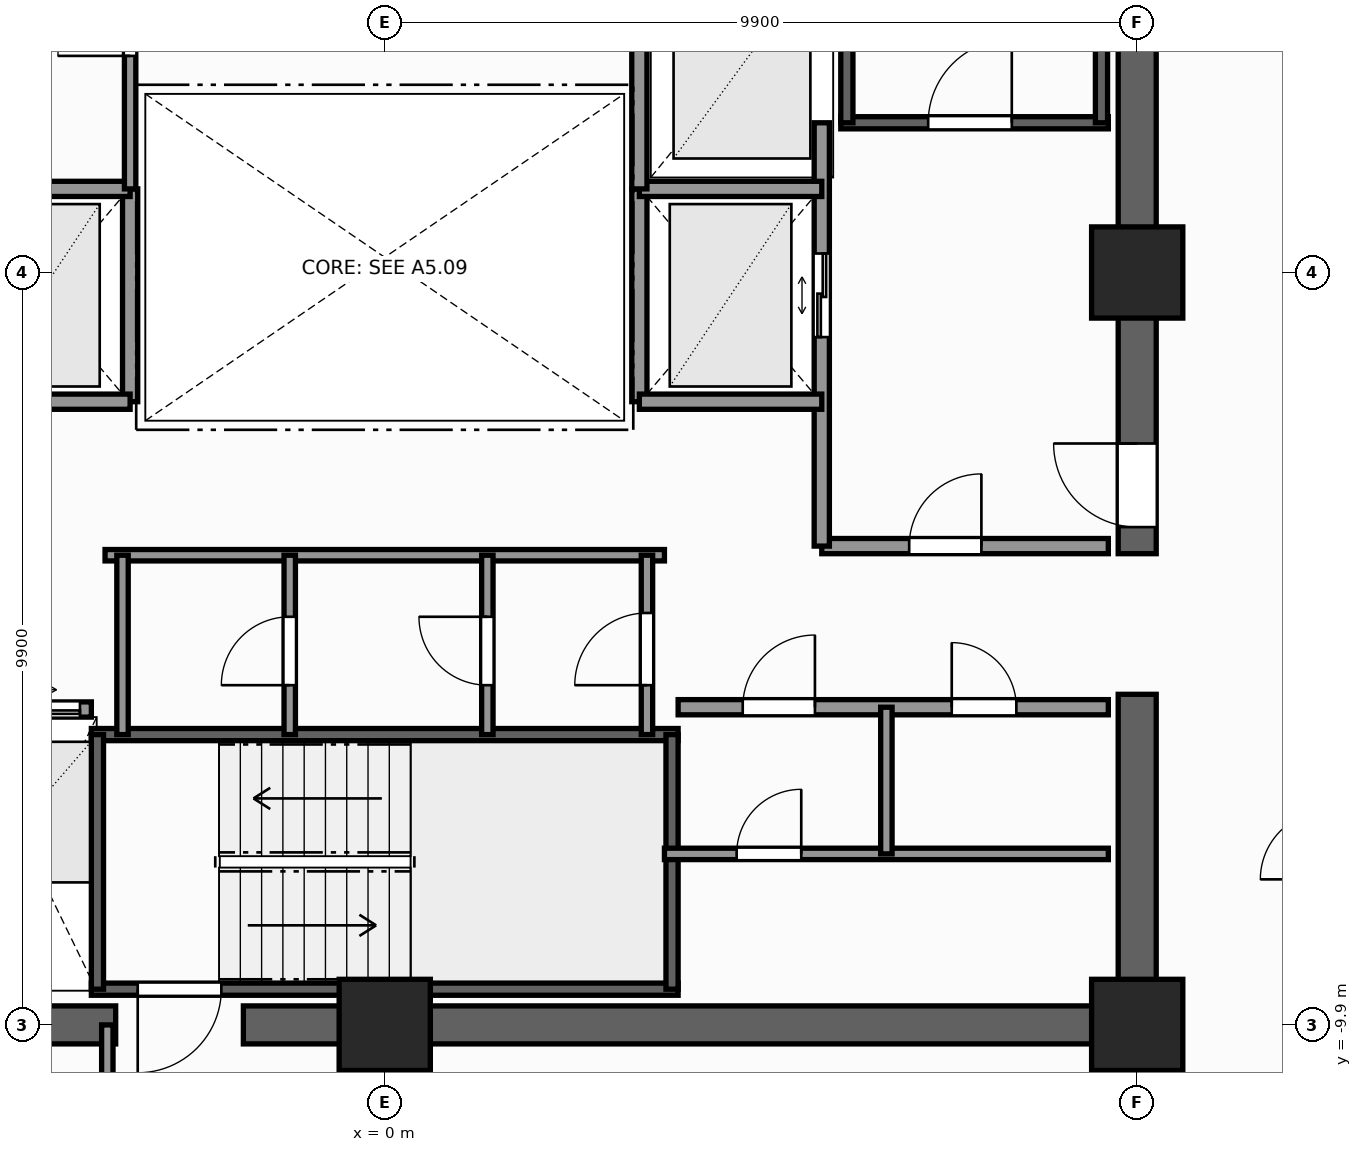
"""IFC4 building model, lengths in metres.
Left out: names, types, materials, properties, quantities, classifications, styles, units other than length and angle.
Written with IfcOpenShell. Run it as: python <this file> out.ifc"""

import sys

from ifc_helpers import new_model, si_unit, direction, frame, frame_2d, origin, origin_2d, place, context, subcontext, project, spatial, rectangle, extrude, element, fill, save


model = new_model("IFC4")
c1 = context("Model", 3, precision=1e-05, world=origin(), true_north=direction((0.0, 1.0)))
c2 = subcontext(c1, "Body", "Model", "MODEL_VIEW")
j1 = project(units=[si_unit("LENGTHUNIT", "METRE"), si_unit("PLANEANGLEUNIT", "RADIAN")], contexts=[c1])
p1 = place(None, origin())
s1 = spatial("IfcSite", under=j1, at=p1, CompositionType="ELEMENT")
p2 = place(p1, origin())
s2 = spatial("IfcBuilding", under=s1, at=p2, CompositionType="ELEMENT")
p3 = place(p2, frame((0.0, 0.0, 134.9)))
s3 = spatial("IfcBuildingStorey", under=s2, at=p3, CompositionType="ELEMENT", Elevation=134.9)
p4 = place(p3, frame((10.15, -9.9, 0.0), z_axis=(0.0, 0.0, 1.0), x_axis=(-1.0, 0.0, 0.0)))
e1 = element("IfcWall", 1, at=p4, inside=s3, PredefinedType="SHEAR", context=c2, shape_type="SweptSolid", body=[
    extrude(rectangle(XDim=12.01, YDim=0.5, at=frame_2d((6.005, 0.0))), origin(), (0.0, 0.0, 1.0), 3.3),
])
p5 = place(p3, frame((-3.54, -9.9, 0.0), z_axis=(0.0, 0.0, 1.0), x_axis=(-1.0, 0.0, 0.0)))
e2 = element("IfcWall", 2, at=p5, inside=s3, PredefinedType="SHEAR", context=c2, shape_type="SweptSolid", body=[
    extrude(rectangle(XDim=6.61, YDim=0.5, at=frame_2d((3.305, 0.0))), origin(), (0.0, 0.0, 1.0), 3.3),
])
p6 = place(p3, frame((9.9, -9.65, 0.0), z_axis=(0.0, 0.0, 1.0), x_axis=(0.0, 1.0, 0.0)))
e3 = element("IfcWall", 3, at=p6, inside=s3, PredefinedType="SHEAR", context=c2, shape_type="SweptSolid", body=[
    extrude(rectangle(XDim=4.1, YDim=0.5, at=frame_2d((2.05, 0.0))), origin(), (0.0, 0.0, 1.0), 3.3),
])
p7 = place(p3, frame((9.9, -3.7, 0.0), z_axis=(0.0, 0.0, 1.0), x_axis=(0.0, 1.0, 0.0)))
e4 = element("IfcWall", 4, at=p7, inside=s3, PredefinedType="SHEAR", context=c2, shape_type="SweptSolid", body=[
    extrude(rectangle(XDim=13.35, YDim=0.5, at=frame_2d((6.675, 0.0))), origin(), (0.0, 0.0, 1.0), 3.3),
])
p8 = place(p7, frame((0.35, 0.0, 0.0)))
e5 = element("IfcOpeningElement", 5, at=p8, cuts=e4, PredefinedType="OPENING", context=c2, shape_type="SweptSolid", body=[
    extrude(rectangle(XDim=1.1, YDim=2.2, at=frame_2d((0.55, 1.1))), frame((0.0, 0.26, 0.0), z_axis=(0.0, -1.0, 0.0), x_axis=(1.0, 0.0, 0.0)), (0.0, 0.0, 1.0), 0.52),
])
for number, where, z_axis, x_axis in (
    (6, (9.9, -9.9, 0.0), (0.0, 0.0, 1.0), (1.0, 0.0, 0.0)),
    (7, (0.0, -9.9, 0.0), (0.0, 0.0, 1.0), (1.0, 0.0, 0.0)),
    (8, (9.9, 0.0, 0.0), (0.0, 0.0, 1.0), (1.0, 0.0, 0.0)),
):
    element("IfcColumn", number, at=place(p3, frame(where, z_axis=z_axis, x_axis=x_axis)), inside=s3, PredefinedType="COLUMN", context=c2, shape_type="SweptSolid", body=[
        extrude(rectangle(XDim=1.2, YDim=1.2, at=origin_2d()), origin(), (0.0, 0.0, 1.0), 3.3),
    ])
p9 = place(p3, frame((6.0, 1.97, 0.0), z_axis=(0.0, 0.0, 1.0), x_axis=(1.0, 0.0, 0.0)))
e9 = element("IfcWall", 9, at=p9, inside=s3, PredefinedType="SHEAR", context=c2, shape_type="SweptSolid", body=[
    extrude(rectangle(XDim=3.52, YDim=0.16, at=frame_2d((1.76, 0.0))), origin(), (0.0, 0.0, 1.0), 3.3),
])
p10 = place(p9, frame((1.15, 0.0, 0.0)))
e10 = element("IfcOpeningElement", 10, at=p10, cuts=e9, PredefinedType="OPENING", context=c2, shape_type="SweptSolid", body=[
    extrude(rectangle(XDim=1.1, YDim=2.2, at=frame_2d((0.55, 1.1))), frame((0.0, 0.09, 0.0), z_axis=(0.0, -1.0, 0.0), x_axis=(1.0, 0.0, 0.0)), (0.0, 0.0, 1.0), 0.18),
])
for number, where, z_axis, x_axis in (
    (11, (6.08, 1.97, 0.0), (0.0, 0.0, 1.0), (0.0, 1.0, 0.0)),
    (12, (9.43, 1.97, 0.0), (0.0, 0.0, 1.0), (0.0, 1.0, 0.0)),
):
    element("IfcWall", number, at=place(p3, frame(where, z_axis=z_axis, x_axis=x_axis)), inside=s3, PredefinedType="SHEAR", context=c2, shape_type="SweptSolid", body=[
        extrude(rectangle(XDim=7.56, YDim=0.16, at=frame_2d((3.78, 0.0))), origin(), (0.0, 0.0, 1.0), 3.3),
    ])
p11 = place(p3, frame((3.86, -9.43, 0.0), z_axis=(0.0, 0.0, 1.0), x_axis=(-1.0, 0.0, 0.0)))
e13 = element("IfcWall", 13, at=p11, inside=s3, PredefinedType="SHEAR", context=c2, shape_type="SweptSolid", body=[
    extrude(rectangle(XDim=7.72, YDim=0.16, at=frame_2d((3.86, 0.0))), origin(), (0.0, 0.0, 1.0), 3.3),
])
p12 = place(p11, frame((6.01, 0.0, 0.0)))
e14 = element("IfcOpeningElement", 14, at=p12, cuts=e13, PredefinedType="OPENING", context=c2, shape_type="SweptSolid", body=[
    extrude(rectangle(XDim=1.1, YDim=2.2, at=frame_2d((0.55, 1.1))), frame((0.0, 0.09, 0.0), z_axis=(0.0, -1.0, 0.0), x_axis=(1.0, 0.0, 0.0)), (0.0, 0.0, 1.0), 0.18),
])
p13 = place(p3, frame((-3.86, -6.08, 0.0), z_axis=(0.0, 0.0, 1.0), x_axis=(1.0, 0.0, 0.0)))
e15 = element("IfcWall", 15, at=p13, inside=s3, PredefinedType="SHEAR", context=c2, shape_type="SweptSolid", body=[
    extrude(rectangle(XDim=7.72, YDim=0.16, at=frame_2d((3.86, 0.0))), origin(), (0.0, 0.0, 1.0), 3.3),
])
for number, where, z_axis, x_axis in (
    (16, (-3.78, -9.43, 0.0), (0.0, 0.0, 1.0), (0.0, 1.0, 0.0)),
    (17, (3.78, -9.43, 0.0), (0.0, 0.0, 1.0), (0.0, 1.0, 0.0)),
):
    element("IfcWall", number, at=place(p3, frame(where, z_axis=z_axis, x_axis=x_axis)), inside=s3, PredefinedType="SHEAR", context=c2, shape_type="SweptSolid", body=[
        extrude(rectangle(XDim=3.35, YDim=0.16, at=frame_2d((1.675, 0.0))), origin(), (0.0, 0.0, 1.0), 3.3),
    ])
p14 = place(p3, frame((-3.35, -1.7, 0.0), z_axis=(0.0, 0.0, 1.0), x_axis=(0.0, 1.0, 0.0)))
e18 = element("IfcWall", 18, at=p14, inside=s3, PredefinedType="SOLIDWALL", context=c2, shape_type="SweptSolid", body=[
    extrude(rectangle(XDim=2.8, YDim=0.2, at=frame_2d((1.4, 0.0))), origin(), (0.0, 0.0, 1.0), 2.735),
])
for number, where, z_axis, x_axis in (
    (19, (-5.75, -1.7, 0.0), (0.0, 0.0, 1.0), (1.0, 0.0, 0.0)),
    (20, (-5.75, 1.1, 0.0), (0.0, 0.0, 1.0), (1.0, 0.0, 0.0)),
):
    element("IfcWall", number, at=place(p3, frame(where, z_axis=z_axis, x_axis=x_axis)), inside=s3, PredefinedType="SOLIDWALL", context=c2, shape_type="SweptSolid", body=[
        extrude(rectangle(XDim=2.4, YDim=0.2, at=frame_2d((1.2, 0.0))), origin(), (0.0, 0.0, 1.0), 3.1),
    ])
p15 = place(p3, frame((5.75, -3.6, 0.0), z_axis=(0.0, 0.0, 1.0), x_axis=(1.0, 0.0, 0.0)))
e21 = element("IfcWall", 21, at=p15, inside=s3, PredefinedType="SOLIDWALL", context=c2, shape_type="SweptSolid", body=[
    extrude(rectangle(XDim=3.77, YDim=0.2, at=frame_2d((1.885, 0.0))), origin(), (0.0, 0.0, 1.0), 3.1),
])
p16 = place(p15, frame((1.15, 0.0, 0.0)))
e22 = element("IfcOpeningElement", 22, at=p16, cuts=e21, PredefinedType="OPENING", context=c2, shape_type="SweptSolid", body=[
    extrude(rectangle(XDim=0.95, YDim=2.06, at=frame_2d((0.475, 1.03))), frame((0.0, 0.11, 0.0), z_axis=(0.0, -1.0, 0.0), x_axis=(1.0, 0.0, 0.0)), (0.0, 0.0, 1.0), 0.22),
])
p17 = place(p3, frame((5.75, -3.6, 0.0), z_axis=(0.0, 0.0, 1.0), x_axis=(0.0, 1.0, 0.0)))
e23 = element("IfcWall", 23, at=p17, inside=s3, PredefinedType="SOLIDWALL", context=c2, shape_type="SweptSolid", body=[
    extrude(rectangle(XDim=5.57, YDim=0.2, at=frame_2d((2.785, 0.0))), origin(), (0.0, 0.0, 1.0), 2.735),
])
p18 = place(p17, frame((2.75, 0.0, 0.0)))
e24 = element("IfcOpeningElement", 24, at=p18, cuts=e23, PredefinedType="OPENING", context=c2, shape_type="SweptSolid", body=[
    extrude(rectangle(XDim=1.1, YDim=2.2, at=frame_2d((0.55, 1.1))), frame((0.0, 0.11, 0.0), z_axis=(0.0, -1.0, 0.0), x_axis=(1.0, 0.0, 0.0)), (0.0, 0.0, 1.0), 0.22),
])
p19 = place(p3, frame((3.35, -1.7, 0.0), z_axis=(0.0, 0.0, 1.0), x_axis=(0.0, 1.0, 0.0)))
e25 = element("IfcWall", 25, at=p19, inside=s3, PredefinedType="SOLIDWALL", context=c2, shape_type="SweptSolid", body=[
    extrude(rectangle(XDim=2.8, YDim=0.2, at=frame_2d((1.4, 0.0))), origin(), (0.0, 0.0, 1.0), 2.735),
])
for number, where, z_axis, x_axis in (
    (26, (3.35, -1.7, 0.0), (0.0, 0.0, 1.0), (1.0, 0.0, 0.0)),
    (27, (3.35, 1.1, 0.0), (0.0, 0.0, 1.0), (1.0, 0.0, 0.0)),
):
    element("IfcWall", number, at=place(p3, frame(where, z_axis=z_axis, x_axis=x_axis)), inside=s3, PredefinedType="SOLIDWALL", context=c2, shape_type="SweptSolid", body=[
        extrude(rectangle(XDim=2.4, YDim=0.2, at=frame_2d((1.2, 0.0))), origin(), (0.0, 0.0, 1.0), 3.1),
    ])
p20 = place(p3, frame((3.35, 1.1, 0.0), z_axis=(0.0, 0.0, 1.0), x_axis=(0.0, 1.0, 0.0)))
e28 = element("IfcWall", 28, at=p20, inside=s3, PredefinedType="SOLIDWALL", context=c2, shape_type="SweptSolid", body=[
    extrude(rectangle(XDim=3.2, YDim=0.2, at=frame_2d((1.6, 0.0))), origin(), (0.0, 0.0, 1.0), 2.735),
])
p21 = place(p3, frame((-9.52, -5.75, 0.0), z_axis=(0.0, 0.0, 1.0), x_axis=(1.0, 0.0, 0.0)))
e29 = element("IfcWall", 29, at=p21, inside=s3, PredefinedType="SOLIDWALL", context=c2, shape_type="SweptSolid", body=[
    extrude(rectangle(XDim=5.66, YDim=0.2, at=frame_2d((2.83, 0.0))), origin(), (0.0, 0.0, 1.0), 3.1),
])
p22 = place(p21, frame((0.55, 0.0, 0.0)))
e30 = element("IfcOpeningElement", 30, at=p22, cuts=e29, PredefinedType="OPENING", context=c2, shape_type="SweptSolid", body=[
    extrude(rectangle(XDim=1.1, YDim=2.2, at=frame_2d((0.55, 1.1))), frame((0.0, 0.11, 0.0), z_axis=(0.0, -1.0, 0.0), x_axis=(1.0, 0.0, 0.0)), (0.0, 0.0, 1.0), 0.22),
])
p23 = place(p21, frame((2.48, 0.0, 0.0)))
e31 = element("IfcOpeningElement", 31, at=p23, cuts=e29, PredefinedType="OPENING", context=c2, shape_type="SweptSolid", body=[
    extrude(rectangle(XDim=1.1, YDim=2.2, at=frame_2d((0.55, 1.1))), frame((0.0, 0.11, 0.0), z_axis=(0.0, -1.0, 0.0), x_axis=(1.0, 0.0, 0.0)), (0.0, 0.0, 1.0), 0.22),
])
p24 = place(p21, frame((4.41, 0.0, 0.0)))
e32 = element("IfcOpeningElement", 32, at=p24, cuts=e29, PredefinedType="OPENING", context=c2, shape_type="SweptSolid", body=[
    extrude(rectangle(XDim=1.1, YDim=2.2, at=frame_2d((0.55, 1.1))), frame((0.0, 0.11, 0.0), z_axis=(0.0, -1.0, 0.0), x_axis=(1.0, 0.0, 0.0)), (0.0, 0.0, 1.0), 0.22),
])
p25 = place(p3, frame((3.86, -5.72, 0.0), z_axis=(0.0, 0.0, 1.0), x_axis=(1.0, 0.0, 0.0)))
e33 = element("IfcWall", 33, at=p25, inside=s3, PredefinedType="SOLIDWALL", context=c2, shape_type="SweptSolid", body=[
    extrude(rectangle(XDim=5.66, YDim=0.2, at=frame_2d((2.83, 0.0))), origin(), (0.0, 0.0, 1.0), 3.1),
])
p26 = place(p25, frame((0.85, 0.0, 0.0)))
e34 = element("IfcOpeningElement", 34, at=p26, cuts=e33, PredefinedType="OPENING", context=c2, shape_type="SweptSolid", body=[
    extrude(rectangle(XDim=0.95, YDim=2.06, at=frame_2d((0.475, 1.03))), frame((0.0, 0.11, 0.0), z_axis=(0.0, -1.0, 0.0), x_axis=(1.0, 0.0, 0.0)), (0.0, 0.0, 1.0), 0.22),
])
p27 = place(p25, frame((3.6, 0.0, 0.0)))
e35 = element("IfcOpeningElement", 35, at=p27, cuts=e33, PredefinedType="OPENING", context=c2, shape_type="SweptSolid", body=[
    extrude(rectangle(XDim=0.85, YDim=2.03, at=frame_2d((0.425, 1.015))), frame((0.0, 0.11, 0.0), z_axis=(0.0, -1.0, 0.0), x_axis=(1.0, 0.0, 0.0)), (0.0, 0.0, 1.0), 0.22),
])
p28 = place(p3, frame((3.68, -7.65, 0.0), z_axis=(0.0, 0.0, 1.0), x_axis=(1.0, 0.0, 0.0)))
e36 = element("IfcWall", 36, at=p28, inside=s3, PredefinedType="PARTITIONING", context=c2, shape_type="SweptSolid", body=[
    extrude(rectangle(XDim=5.84, YDim=0.15, at=frame_2d((2.92, 0.0))), origin(), (0.0, 0.0, 1.0), 3.1),
])
p29 = place(p28, frame((0.95, 0.0, 0.0)))
e37 = element("IfcOpeningElement", 37, at=p29, cuts=e36, PredefinedType="OPENING", context=c2, shape_type="SweptSolid", body=[
    extrude(rectangle(XDim=0.85, YDim=2.03, at=frame_2d((0.425, 1.015))), frame((0.0, 0.085, 0.0), z_axis=(0.0, -1.0, 0.0), x_axis=(1.0, 0.0, 0.0)), (0.0, 0.0, 1.0), 0.17),
])
p30 = place(p3, frame((6.6, -7.65, 0.0), z_axis=(0.0, 0.0, 1.0), x_axis=(0.0, 1.0, 0.0)))
e38 = element("IfcWall", 38, at=p30, inside=s3, PredefinedType="PARTITIONING", context=c2, shape_type="SweptSolid", body=[
    extrude(rectangle(XDim=1.93, YDim=0.15, at=frame_2d((0.965, 0.0))), origin(), (0.0, 0.0, 1.0), 3.1),
])
p31 = place(p3, frame((-3.68, -3.72, 0.0), z_axis=(0.0, 0.0, 1.0), x_axis=(1.0, 0.0, 0.0)))
e39 = element("IfcWall", 39, at=p31, inside=s3, PredefinedType="PARTITIONING", context=c2, shape_type="SweptSolid", body=[
    extrude(rectangle(XDim=7.36, YDim=0.15, at=frame_2d((3.68, 0.0))), origin(), (0.0, 0.0, 1.0), 3.1),
])
p32 = place(p3, frame((3.45, -6.08, 0.0), z_axis=(0.0, 0.0, 1.0), x_axis=(0.0, 1.0, 0.0)))
e40 = element("IfcWall", 40, at=p32, inside=s3, PredefinedType="PARTITIONING", context=c2, shape_type="SweptSolid", body=[
    extrude(rectangle(XDim=2.36, YDim=0.15, at=frame_2d((1.18, 0.0))), origin(), (0.0, 0.0, 1.0), 3.1),
])
p33 = place(p32, frame((0.65, 0.0, 0.0)))
e41 = element("IfcOpeningElement", 41, at=p33, cuts=e40, PredefinedType="OPENING", context=c2, shape_type="SweptSolid", body=[
    extrude(rectangle(XDim=0.95, YDim=2.06, at=frame_2d((0.475, 1.03))), frame((0.0, 0.085, 0.0), z_axis=(0.0, -1.0, 0.0), x_axis=(1.0, 0.0, 0.0)), (0.0, 0.0, 1.0), 0.17),
])
p34 = place(p3, frame((-3.45, -6.08, 0.0), z_axis=(0.0, 0.0, 1.0), x_axis=(0.0, 1.0, 0.0)))
e42 = element("IfcWall", 42, at=p34, inside=s3, PredefinedType="PARTITIONING", context=c2, shape_type="SweptSolid", body=[
    extrude(rectangle(XDim=2.36, YDim=0.15, at=frame_2d((1.18, 0.0))), origin(), (0.0, 0.0, 1.0), 3.1),
])
p35 = place(p3, frame((1.35, -6.08, 0.0), z_axis=(0.0, 0.0, 1.0), x_axis=(0.0, 1.0, 0.0)))
e43 = element("IfcWall", 43, at=p35, inside=s3, PredefinedType="PARTITIONING", context=c2, shape_type="SweptSolid", body=[
    extrude(rectangle(XDim=2.36, YDim=0.15, at=frame_2d((1.18, 0.0))), origin(), (0.0, 0.0, 1.0), 3.1),
])
p36 = place(p35, frame((0.65, 0.0, 0.0)))
e44 = element("IfcOpeningElement", 44, at=p36, cuts=e43, PredefinedType="OPENING", context=c2, shape_type="SweptSolid", body=[
    extrude(rectangle(XDim=0.9, YDim=2.06, at=frame_2d((0.45, 1.03))), frame((0.0, 0.085, 0.0), z_axis=(0.0, -1.0, 0.0), x_axis=(1.0, 0.0, 0.0)), (0.0, 0.0, 1.0), 0.17),
])
p37 = place(p3, frame((-1.25, -6.08, 0.0), z_axis=(0.0, 0.0, 1.0), x_axis=(0.0, 1.0, 0.0)))
e45 = element("IfcWall", 45, at=p37, inside=s3, PredefinedType="PARTITIONING", context=c2, shape_type="SweptSolid", body=[
    extrude(rectangle(XDim=2.36, YDim=0.15, at=frame_2d((1.18, 0.0))), origin(), (0.0, 0.0, 1.0), 3.1),
])
p38 = place(p37, frame((0.65, 0.0, 0.0)))
e46 = element("IfcOpeningElement", 46, at=p38, cuts=e45, PredefinedType="OPENING", context=c2, shape_type="SweptSolid", body=[
    extrude(rectangle(XDim=0.9, YDim=2.06, at=frame_2d((0.45, 1.03))), frame((0.0, 0.085, 0.0), z_axis=(0.0, -1.0, 0.0), x_axis=(1.0, 0.0, 0.0)), (0.0, 0.0, 1.0), 0.17),
])
p39 = place(p3, frame((-3.35, 1.1, 0.0), z_axis=(0.0, 0.0, 1.0), x_axis=(0.0, 1.0, 0.0)))
e47 = element("IfcWall", 47, at=p39, inside=s3, PredefinedType="PARTITIONING", context=c2, shape_type="SweptSolid", body=[
    extrude(rectangle(XDim=3.2, YDim=0.15, at=frame_2d((1.6, 0.0))), origin(), (0.0, 0.0, 1.0), 2.735),
])
p40 = place(p39, frame((1.75, 0.0, 0.0)))
e48 = element("IfcOpeningElement", 48, at=p40, cuts=e47, PredefinedType="OPENING", context=c2, shape_type="SweptSolid", body=[
    extrude(rectangle(XDim=0.95, YDim=2.06, at=frame_2d((0.475, 1.03))), frame((0.0, 0.085, 0.0), z_axis=(0.0, -1.0, 0.0), x_axis=(1.0, 0.0, 0.0)), (0.0, 0.0, 1.0), 0.17),
])
p41 = place(p3, frame((-3.65, -12.58, 0.0), z_axis=(0.0, 0.0, 1.0), x_axis=(0.0, 1.0, 0.0)))
e49 = element("IfcWall", 49, at=p41, inside=s3, PredefinedType="PARTITIONING", context=c2, shape_type="SweptSolid", body=[
    extrude(rectangle(XDim=2.68, YDim=0.15, at=frame_2d((1.34, 0.0))), origin(), (0.0, 0.0, 1.0), 3.1),
])
p42 = place(p10, origin())
e50 = element("IfcDoor", 50, at=p42, inside=s3, OperationType="SINGLE_SWING_RIGHT", PredefinedType="DOOR", context=c2, shape_type="SweptSolid", body=[
    extrude(rectangle(XDim=1.1, YDim=2.2, at=frame_2d((0.55, 1.1))), frame((0.0, 0.025, 0.0), z_axis=(0.0, -1.0, 0.0), x_axis=(1.0, 0.0, 0.0)), (0.0, 0.0, 1.0), 0.05),
])
fill(e10, e50)
p43 = place(p12, origin())
e51 = element("IfcDoor", 51, at=p43, inside=s3, OperationType="SINGLE_SWING_RIGHT", PredefinedType="DOOR", context=c2, shape_type="SweptSolid", body=[
    extrude(rectangle(XDim=1.1, YDim=2.2, at=frame_2d((0.55, 1.1))), frame((0.0, 0.025, 0.0), z_axis=(0.0, -1.0, 0.0), x_axis=(1.0, 0.0, 0.0)), (0.0, 0.0, 1.0), 0.05),
])
fill(e14, e51)
p44 = place(p8, origin())
e52 = element("IfcDoor", 52, at=p44, inside=s3, OperationType="SINGLE_SWING_RIGHT", PredefinedType="DOOR", context=c2, shape_type="SweptSolid", body=[
    extrude(rectangle(XDim=1.1, YDim=2.2, at=frame_2d((0.55, 1.1))), frame((0.0, 0.025, 0.0), z_axis=(0.0, -1.0, 0.0), x_axis=(1.0, 0.0, 0.0)), (0.0, 0.0, 1.0), 0.05),
])
fill(e5, e52)
p45 = place(p18, origin())
e53 = element("IfcDoor", 53, at=p45, inside=s3, OperationType="DOUBLE_DOOR_SLIDING", PredefinedType="DOOR", context=c2, shape_type="SweptSolid", body=[
    extrude(rectangle(XDim=1.1, YDim=2.2, at=frame_2d((0.55, 1.1))), frame((0.0, 0.025, 0.0), z_axis=(0.0, -1.0, 0.0), x_axis=(1.0, 0.0, 0.0)), (0.0, 0.0, 1.0), 0.05),
])
fill(e24, e53)
p46 = place(p24, origin())
e54 = element("IfcDoor", 54, at=p46, inside=s3, OperationType="DOUBLE_DOOR_SLIDING", PredefinedType="DOOR", context=c2, shape_type="SweptSolid", body=[
    extrude(rectangle(XDim=1.1, YDim=2.2, at=frame_2d((0.55, 1.1))), frame((0.0, 0.025, 0.0), z_axis=(0.0, -1.0, 0.0), x_axis=(1.0, 0.0, 0.0)), (0.0, 0.0, 1.0), 0.05),
])
fill(e32, e54)
p47 = place(p26, origin())
e55 = element("IfcDoor", 55, at=p47, inside=s3, OperationType="SINGLE_SWING_RIGHT", PredefinedType="DOOR", context=c2, shape_type="SweptSolid", body=[
    extrude(rectangle(XDim=0.95, YDim=2.06, at=frame_2d((0.475, 1.03))), frame((0.0, 0.025, 0.0), z_axis=(0.0, -1.0, 0.0), x_axis=(1.0, 0.0, 0.0)), (0.0, 0.0, 1.0), 0.05),
])
fill(e34, e55)
p48 = place(p27, origin())
e56 = element("IfcDoor", 56, at=p48, inside=s3, OperationType="SINGLE_SWING_LEFT", PredefinedType="DOOR", context=c2, shape_type="SweptSolid", body=[
    extrude(rectangle(XDim=0.85, YDim=2.03, at=frame_2d((0.425, 1.015))), frame((0.0, 0.025, 0.0), z_axis=(0.0, -1.0, 0.0), x_axis=(1.0, 0.0, 0.0)), (0.0, 0.0, 1.0), 0.05),
])
fill(e35, e56)
p49 = place(p29, origin())
e57 = element("IfcDoor", 57, at=p49, inside=s3, OperationType="SINGLE_SWING_RIGHT", PredefinedType="DOOR", context=c2, shape_type="SweptSolid", body=[
    extrude(rectangle(XDim=0.85, YDim=2.03, at=frame_2d((0.425, 1.015))), frame((0.0, 0.025, 0.0), z_axis=(0.0, -1.0, 0.0), x_axis=(1.0, 0.0, 0.0)), (0.0, 0.0, 1.0), 0.05),
])
fill(e37, e57)
p50 = place(p16, origin())
e58 = element("IfcDoor", 58, at=p50, inside=s3, OperationType="SINGLE_SWING_RIGHT", PredefinedType="DOOR", context=c2, shape_type="SweptSolid", body=[
    extrude(rectangle(XDim=0.95, YDim=2.06, at=frame_2d((0.475, 1.03))), frame((0.0, 0.025, 0.0), z_axis=(0.0, -1.0, 0.0), x_axis=(1.0, 0.0, 0.0)), (0.0, 0.0, 1.0), 0.05),
])
fill(e22, e58)
p51 = place(p33, origin())
e59 = element("IfcDoor", 59, at=p51, inside=s3, OperationType="SINGLE_SWING_LEFT", PredefinedType="DOOR", context=c2, shape_type="SweptSolid", body=[
    extrude(rectangle(XDim=0.95, YDim=2.06, at=frame_2d((0.475, 1.03))), frame((0.0, 0.025, 0.0), z_axis=(0.0, -1.0, 0.0), x_axis=(1.0, 0.0, 0.0)), (0.0, 0.0, 1.0), 0.05),
])
fill(e41, e59)
p52 = place(p36, origin())
e60 = element("IfcDoor", 60, at=p52, inside=s3, OperationType="SINGLE_SWING_RIGHT", PredefinedType="DOOR", context=c2, shape_type="SweptSolid", body=[
    extrude(rectangle(XDim=0.9, YDim=2.06, at=frame_2d((0.45, 1.03))), frame((0.0, 0.025, 0.0), z_axis=(0.0, -1.0, 0.0), x_axis=(1.0, 0.0, 0.0)), (0.0, 0.0, 1.0), 0.05),
])
fill(e44, e60)
p53 = place(p38, origin())
e61 = element("IfcDoor", 61, at=p53, inside=s3, OperationType="SINGLE_SWING_LEFT", PredefinedType="DOOR", context=c2, shape_type="SweptSolid", body=[
    extrude(rectangle(XDim=0.9, YDim=2.06, at=frame_2d((0.45, 1.03))), frame((0.0, 0.025, 0.0), z_axis=(0.0, -1.0, 0.0), x_axis=(1.0, 0.0, 0.0)), (0.0, 0.0, 1.0), 0.05),
])
fill(e46, e61)
p54 = place(p40, origin())
e62 = element("IfcDoor", 62, at=p54, inside=s3, OperationType="SINGLE_SWING_LEFT", PredefinedType="DOOR", context=c2, shape_type="SweptSolid", body=[
    extrude(rectangle(XDim=0.95, YDim=2.06, at=frame_2d((0.475, 1.03))), frame((0.0, 0.025, 0.0), z_axis=(0.0, -1.0, 0.0), x_axis=(1.0, 0.0, 0.0)), (0.0, 0.0, 1.0), 0.05),
])
fill(e48, e62)
save(model, sys.argv[1])
